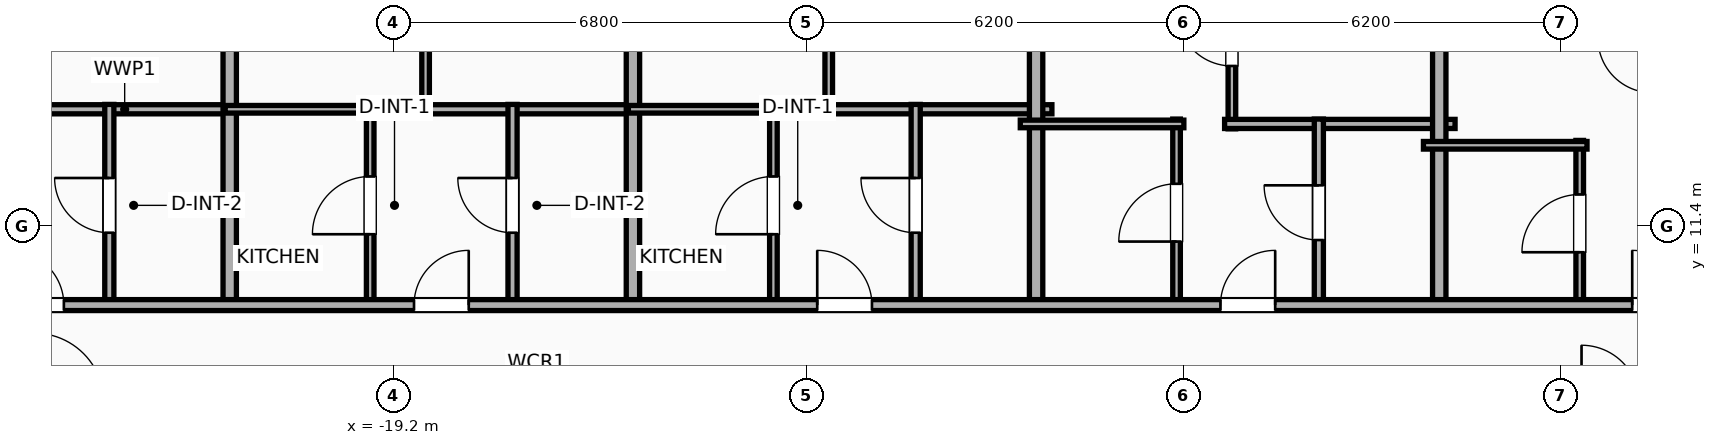
"""IFC4 building model, lengths in metres.
Left out: names, types, materials, properties, quantities, classifications, styles, units other than length and angle.
Written with IfcOpenShell. Run it as: python <this file> out.ifc"""

import sys

from ifc_helpers import new_model, si_unit, direction, frame, frame_2d, origin, place, context, subcontext, project, spatial, rectangle, extrude, element, fill, save


model = new_model("IFC4")
c1 = context("Model", 3, precision=1e-05, world=origin(), true_north=direction((0.0, 1.0)))
c2 = subcontext(c1, "Body", "Model", "MODEL_VIEW")
j1 = project(units=[si_unit("LENGTHUNIT", "METRE"), si_unit("PLANEANGLEUNIT", "RADIAN")], contexts=[c1])
p1 = place(None, origin())
s1 = spatial("IfcSite", under=j1, at=p1, CompositionType="ELEMENT")
p2 = place(p1, origin())
s2 = spatial("IfcBuilding", under=s1, at=p2, CompositionType="ELEMENT")
p3 = place(p2, frame((0.0, 0.0, 271.7)))
s3 = spatial("IfcBuildingStorey", under=s2, at=p3, CompositionType="ELEMENT", Elevation=271.7)
p4 = place(p3, frame((-25.421, 13.32, 0.0), z_axis=(0.0, 0.0, 1.0), x_axis=(1.0, 0.0, 0.0)))
e1 = element("IfcWall", 1, at=p4, inside=s3, PredefinedType="PLUMBINGWALL", context=c2, shape_type="SweptSolid", body=[
    extrude(rectangle(XDim=3.605, YDim=0.15, at=frame_2d((1.802, 0.0))), origin(), (0.0, 0.0, 1.0), 3.65),
])
p5 = place(p3, frame((-23.871, 10.08, 0.0), z_axis=(0.0, 0.0, 1.0), x_axis=(0.0, 1.0, 0.0)))
e2 = element("IfcWall", 2, at=p5, inside=s3, PredefinedType="PLUMBINGWALL", context=c2, shape_type="SweptSolid", body=[
    extrude(rectangle(XDim=3.32, YDim=0.15, at=frame_2d((1.66, 0.0))), origin(), (0.0, 0.0, 1.0), 3.65),
])
p6 = place(p5, frame((1.21, 0.0, 0.0)))
e3 = element("IfcOpeningElement", 3, at=p6, cuts=e2, PredefinedType="OPENING", context=c2, shape_type="SweptSolid", body=[
    extrude(rectangle(XDim=0.9, YDim=2.05, at=frame_2d((0.45, 1.025))), frame((0.0, 0.085, 0.0), z_axis=(0.0, -1.0, 0.0), x_axis=(1.0, 0.0, 0.0)), (0.0, 0.0, 1.0), 0.17),
])
p7 = place(p3, frame((-21.891, 10.02, 0.0), z_axis=(0.0, 0.0, 1.0), x_axis=(0.0, 1.0, 0.0)))
e4 = element("IfcWall", 4, at=p7, inside=s3, PredefinedType="PARTITIONING", context=c2, shape_type="SweptSolid", body=[
    extrude(rectangle(XDim=10.74, YDim=0.22, at=frame_2d((5.37, 0.0))), origin(), (0.0, 0.0, 1.0), 3.09),
])
p8 = place(p3, frame((-18.67, 13.24, 0.0), z_axis=(0.0, 0.0, 1.0), x_axis=(0.0, 1.0, 0.0)))
e5 = element("IfcWall", 5, at=p8, inside=s3, PredefinedType="PARTITIONING", context=c2, shape_type="SweptSolid", body=[
    extrude(rectangle(XDim=7.333, YDim=0.125, at=frame_2d((3.666, 0.0))), origin(), (0.0, 0.0, 1.0), 3.65),
])
p9 = place(p8, frame((1.31, 0.0, 0.0)))
e6 = element("IfcOpeningElement", 6, at=p9, cuts=e5, PredefinedType="OPENING", context=c2, shape_type="SweptSolid", body=[
    extrude(rectangle(XDim=0.9, YDim=2.05, at=frame_2d((0.45, 1.025))), frame((0.0, 0.073, 0.0), z_axis=(0.0, -1.0, 0.0), x_axis=(1.0, 0.0, 0.0)), (0.0, 0.0, 1.0), 0.145),
])
p10 = place(p3, frame((-18.79, 13.32, 0.0), z_axis=(0.0, 0.0, 1.0), x_axis=(1.0, 0.0, 0.0)))
e7 = element("IfcWall", 7, at=p10, inside=s3, PredefinedType="PLUMBINGWALL", context=c2, shape_type="SweptSolid", body=[
    extrude(rectangle(XDim=3.605, YDim=0.15, at=frame_2d((1.802, 0.0))), origin(), (0.0, 0.0, 1.0), 3.65),
])
p11 = place(p3, frame((-19.581, 10.08, 0.0), z_axis=(0.0, 0.0, 1.0), x_axis=(0.0, 1.0, 0.0)))
e8 = element("IfcWall", 8, at=p11, inside=s3, PredefinedType="PARTITIONING", context=c2, shape_type="SweptSolid", body=[
    extrude(rectangle(XDim=3.32, YDim=0.125, at=frame_2d((1.66, 0.0))), origin(), (0.0, 0.0, 1.0), 3.65),
])
p12 = place(p11, frame((1.185, 0.0, 0.0)))
e9 = element("IfcOpeningElement", 9, at=p12, cuts=e8, PredefinedType="OPENING", context=c2, shape_type="SweptSolid", body=[
    extrude(rectangle(XDim=0.95, YDim=2.05, at=frame_2d((0.475, 1.025))), frame((0.0, 0.073, 0.0), z_axis=(0.0, -1.0, 0.0), x_axis=(1.0, 0.0, 0.0)), (0.0, 0.0, 1.0), 0.145),
])
p13 = place(p3, frame((-21.966, 13.32, 0.0), z_axis=(0.0, 0.0, 1.0), x_axis=(1.0, 0.0, 0.0)))
e10 = element("IfcWall", 10, at=p13, inside=s3, PredefinedType="PARTITIONING", context=c2, shape_type="SweptSolid", body=[
    extrude(rectangle(XDim=2.505, YDim=0.125, at=frame_2d((1.252, 0.0))), origin(), (0.0, 0.0, 1.0), 3.65),
])
p14 = place(p3, frame((-17.24, 10.08, 0.0), z_axis=(0.0, 0.0, 1.0), x_axis=(0.0, 1.0, 0.0)))
e11 = element("IfcWall", 11, at=p14, inside=s3, PredefinedType="PLUMBINGWALL", context=c2, shape_type="SweptSolid", body=[
    extrude(rectangle(XDim=3.32, YDim=0.15, at=frame_2d((1.66, 0.0))), origin(), (0.0, 0.0, 1.0), 3.65),
])
p15 = place(p14, frame((1.21, 0.0, 0.0)))
e12 = element("IfcOpeningElement", 12, at=p15, cuts=e11, PredefinedType="OPENING", context=c2, shape_type="SweptSolid", body=[
    extrude(rectangle(XDim=0.9, YDim=2.05, at=frame_2d((0.45, 1.025))), frame((0.0, 0.085, 0.0), z_axis=(0.0, -1.0, 0.0), x_axis=(1.0, 0.0, 0.0)), (0.0, 0.0, 1.0), 0.17),
])
p16 = place(p3, frame((-15.26, 10.02, 0.0), z_axis=(0.0, 0.0, 1.0), x_axis=(0.0, 1.0, 0.0)))
e13 = element("IfcWall", 13, at=p16, inside=s3, PredefinedType="PARTITIONING", context=c2, shape_type="SweptSolid", body=[
    extrude(rectangle(XDim=10.043, YDim=0.22, at=frame_2d((5.021, 0.0))), origin(), (0.0, 0.0, 1.0), 3.09),
])
p17 = place(p3, frame((-12.04, 13.24, 0.0), z_axis=(0.0, 0.0, 1.0), x_axis=(0.0, 1.0, 0.0)))
e14 = element("IfcWall", 14, at=p17, inside=s3, PredefinedType="PARTITIONING", context=c2, shape_type="SweptSolid", body=[
    extrude(rectangle(XDim=6.635, YDim=0.125, at=frame_2d((3.318, 0.0))), origin(), (0.0, 0.0, 1.0), 3.65),
])
p18 = place(p17, frame((1.143, 0.0, 0.0)))
e15 = element("IfcOpeningElement", 15, at=p18, cuts=e14, PredefinedType="OPENING", context=c2, shape_type="SweptSolid", body=[
    extrude(rectangle(XDim=0.9, YDim=2.05, at=frame_2d((0.45, 1.025))), frame((0.0, 0.073, 0.0), z_axis=(0.0, -1.0, 0.0), x_axis=(1.0, 0.0, 0.0)), (0.0, 0.0, 1.0), 0.145),
])
p19 = place(p3, frame((-12.16, 13.32, 0.0), z_axis=(0.0, 0.0, 1.0), x_axis=(1.0, 0.0, 0.0)))
e16 = element("IfcWall", 16, at=p19, inside=s3, PredefinedType="PLUMBINGWALL", context=c2, shape_type="SweptSolid", body=[
    extrude(rectangle(XDim=3.79, YDim=0.15, at=frame_2d((1.895, 0.0))), origin(), (0.0, 0.0, 1.0), 3.65),
])
p20 = place(p3, frame((-12.95, 10.08, 0.0), z_axis=(0.0, 0.0, 1.0), x_axis=(0.0, 1.0, 0.0)))
e17 = element("IfcWall", 17, at=p20, inside=s3, PredefinedType="PARTITIONING", context=c2, shape_type="SweptSolid", body=[
    extrude(rectangle(XDim=3.32, YDim=0.125, at=frame_2d((1.66, 0.0))), origin(), (0.0, 0.0, 1.0), 3.65),
])
p21 = place(p20, frame((1.185, 0.0, 0.0)))
e18 = element("IfcOpeningElement", 18, at=p21, cuts=e17, PredefinedType="OPENING", context=c2, shape_type="SweptSolid", body=[
    extrude(rectangle(XDim=0.95, YDim=2.05, at=frame_2d((0.475, 1.025))), frame((0.0, 0.073, 0.0), z_axis=(0.0, -1.0, 0.0), x_axis=(1.0, 0.0, 0.0)), (0.0, 0.0, 1.0), 0.145),
])
p22 = place(p3, frame((-15.335, 13.32, 0.0), z_axis=(0.0, 0.0, 1.0), x_axis=(1.0, 0.0, 0.0)))
e19 = element("IfcWall", 19, at=p22, inside=s3, PredefinedType="PARTITIONING", context=c2, shape_type="SweptSolid", body=[
    extrude(rectangle(XDim=2.505, YDim=0.125, at=frame_2d((1.252, 0.0))), origin(), (0.0, 0.0, 1.0), 3.65),
])
p23 = place(p3, frame((-10.61, 10.08, 0.0), z_axis=(0.0, 0.0, 1.0), x_axis=(0.0, 1.0, 0.0)))
e20 = element("IfcWall", 20, at=p23, inside=s3, PredefinedType="PLUMBINGWALL", context=c2, shape_type="SweptSolid", body=[
    extrude(rectangle(XDim=3.32, YDim=0.15, at=frame_2d((1.66, 0.0))), origin(), (0.0, 0.0, 1.0), 3.65),
])
p24 = place(p23, frame((1.21, 0.0, 0.0)))
e21 = element("IfcOpeningElement", 21, at=p24, cuts=e20, PredefinedType="OPENING", context=c2, shape_type="SweptSolid", body=[
    extrude(rectangle(XDim=0.9, YDim=2.05, at=frame_2d((0.45, 1.025))), frame((0.0, 0.085, 0.0), z_axis=(0.0, -1.0, 0.0), x_axis=(1.0, 0.0, 0.0)), (0.0, 0.0, 1.0), 0.17),
])
p25 = place(p3, frame((-8.63, 10.02, 0.0), z_axis=(0.0, 0.0, 1.0), x_axis=(0.0, 1.0, 0.0)))
e22 = element("IfcWall", 22, at=p25, inside=s3, PredefinedType="PARTITIONING", context=c2, shape_type="SweptSolid", body=[
    extrude(rectangle(XDim=9.346, YDim=0.22, at=frame_2d((4.673, 0.0))), origin(), (0.0, 0.0, 1.0), 3.65),
])
p26 = place(p3, frame((-5.41, 12.999, 0.0), z_axis=(0.0, 0.0, 1.0), x_axis=(0.0, 1.0, 0.0)))
e23 = element("IfcWall", 23, at=p26, inside=s3, PredefinedType="PARTITIONING", context=c2, shape_type="SweptSolid", body=[
    extrude(rectangle(XDim=6.18, YDim=0.125, at=frame_2d((3.09, 0.0))), origin(), (0.0, 0.0, 1.0), 3.09),
])
p27 = place(p26, frame((1.033, 0.0, 0.0)))
e24 = element("IfcOpeningElement", 24, at=p27, cuts=e23, PredefinedType="OPENING", context=c2, shape_type="SweptSolid", body=[
    extrude(rectangle(XDim=0.9, YDim=2.05, at=frame_2d((0.45, 1.025))), frame((0.0, 0.073, 0.0), z_axis=(0.0, -1.0, 0.0), x_axis=(1.0, 0.0, 0.0)), (0.0, 0.0, 1.0), 0.145),
])
p28 = place(p3, frame((-5.53, 13.079, 0.0), z_axis=(0.0, 0.0, 1.0), x_axis=(1.0, 0.0, 0.0)))
e25 = element("IfcWall", 25, at=p28, inside=s3, PredefinedType="PLUMBINGWALL", context=c2, shape_type="SweptSolid", body=[
    extrude(rectangle(XDim=3.79, YDim=0.15, at=frame_2d((1.895, 0.0))), origin(), (0.0, 0.0, 1.0), 3.65),
])
p29 = place(p3, frame((-6.32, 10.08, 0.0), z_axis=(0.0, 0.0, 1.0), x_axis=(0.0, 1.0, 0.0)))
e26 = element("IfcWall", 26, at=p29, inside=s3, PredefinedType="PARTITIONING", context=c2, shape_type="SweptSolid", body=[
    extrude(rectangle(XDim=3.079, YDim=0.125, at=frame_2d((1.54, 0.0))), origin(), (0.0, 0.0, 1.0), 3.65),
])
p30 = place(p29, frame((1.064, 0.0, 0.0)))
e27 = element("IfcOpeningElement", 27, at=p30, cuts=e26, PredefinedType="OPENING", context=c2, shape_type="SweptSolid", body=[
    extrude(rectangle(XDim=0.95, YDim=2.05, at=frame_2d((0.475, 1.025))), frame((0.0, 0.073, 0.0), z_axis=(0.0, -1.0, 0.0), x_axis=(1.0, 0.0, 0.0)), (0.0, 0.0, 1.0), 0.145),
])
p31 = place(p3, frame((-8.89, 13.079, 0.0), z_axis=(0.0, 0.0, 1.0), x_axis=(1.0, 0.0, 0.0)))
e28 = element("IfcWall", 28, at=p31, inside=s3, PredefinedType="PARTITIONING", context=c2, shape_type="SweptSolid", body=[
    extrude(rectangle(XDim=2.69, YDim=0.125, at=frame_2d((1.345, 0.0))), origin(), (0.0, 0.0, 1.0), 3.65),
])
p32 = place(p3, frame((-3.98, 10.08, 0.0), z_axis=(0.0, 0.0, 1.0), x_axis=(0.0, 1.0, 0.0)))
e29 = element("IfcWall", 29, at=p32, inside=s3, PredefinedType="PLUMBINGWALL", context=c2, shape_type="SweptSolid", body=[
    extrude(rectangle(XDim=3.079, YDim=0.15, at=frame_2d((1.54, 0.0))), origin(), (0.0, 0.0, 1.0), 3.65),
])
p33 = place(p32, frame((1.09, 0.0, 0.0)))
e30 = element("IfcOpeningElement", 30, at=p33, cuts=e29, PredefinedType="OPENING", context=c2, shape_type="SweptSolid", body=[
    extrude(rectangle(XDim=0.9, YDim=2.05, at=frame_2d((0.45, 1.025))), frame((0.0, 0.085, 0.0), z_axis=(0.0, -1.0, 0.0), x_axis=(1.0, 0.0, 0.0)), (0.0, 0.0, 1.0), 0.17),
])
p34 = place(p3, frame((-2.0, 10.02, 0.0), z_axis=(0.0, 0.0, 1.0), x_axis=(0.0, 1.0, 0.0)))
e31 = element("IfcWall", 31, at=p34, inside=s3, PredefinedType="PARTITIONING", context=c2, shape_type="SweptSolid", body=[
    extrude(rectangle(XDim=8.65, YDim=0.22, at=frame_2d((4.325, 0.0))), origin(), (0.0, 0.0, 1.0), 3.65),
])
p35 = place(p3, frame((0.31, 10.08, 0.0), z_axis=(0.0, 0.0, 1.0), x_axis=(0.0, 1.0, 0.0)))
e32 = element("IfcWall", 32, at=p35, inside=s3, PredefinedType="PARTITIONING", context=c2, shape_type="SweptSolid", body=[
    extrude(rectangle(XDim=2.728, YDim=0.125, at=frame_2d((1.364, 0.0))), origin(), (0.0, 0.0, 1.0), 3.65),
])
p36 = place(p35, frame((0.889, 0.0, 0.0)))
e33 = element("IfcOpeningElement", 33, at=p36, cuts=e32, PredefinedType="OPENING", context=c2, shape_type="SweptSolid", body=[
    extrude(rectangle(XDim=0.95, YDim=2.05, at=frame_2d((0.475, 1.025))), frame((0.0, 0.073, 0.0), z_axis=(0.0, -1.0, 0.0), x_axis=(1.0, 0.0, 0.0)), (0.0, 0.0, 1.0), 0.145),
])
p37 = place(p3, frame((-2.26, 12.728, 0.0), z_axis=(0.0, 0.0, 1.0), x_axis=(1.0, 0.0, 0.0)))
e34 = element("IfcWall", 34, at=p37, inside=s3, PredefinedType="PARTITIONING", context=c2, shape_type="SweptSolid", body=[
    extrude(rectangle(XDim=2.69, YDim=0.125, at=frame_2d((1.345, 0.0))), origin(), (0.0, 0.0, 1.0), 3.65),
])
p38 = place(p3, frame((-28.516, 10.1, 0.0), z_axis=(0.0, 0.0, 1.0), x_axis=(1.0, 0.0, 0.0)))
e35 = element("IfcWall", 35, at=p38, inside=s3, PredefinedType="PARTITIONING", context=c2, shape_type="SweptSolid", body=[
    extrude(rectangle(XDim=53.955, YDim=0.18, at=frame_2d((26.978, 0.0))), origin(), (0.0, 0.0, 1.0), 3.65),
])
p39 = place(p38, frame((2.998, 0.0, 0.0)))
e36 = element("IfcOpeningElement", 36, at=p39, cuts=e35, PredefinedType="OPENING", context=c2, shape_type="SweptSolid", body=[
    extrude(rectangle(XDim=0.9, YDim=2.05, at=frame_2d((0.45, 1.025))), frame((0.0, 0.1, 0.0), z_axis=(0.0, -1.0, 0.0), x_axis=(1.0, 0.0, 0.0)), (0.0, 0.0, 1.0), 0.2),
])
p40 = place(p38, frame((9.656, 0.0, 0.0)))
e37 = element("IfcOpeningElement", 37, at=p40, cuts=e35, PredefinedType="OPENING", context=c2, shape_type="SweptSolid", body=[
    extrude(rectangle(XDim=0.9, YDim=2.05, at=frame_2d((0.45, 1.025))), frame((0.0, 0.1, 0.0), z_axis=(0.0, -1.0, 0.0), x_axis=(1.0, 0.0, 0.0)), (0.0, 0.0, 1.0), 0.2),
])
p41 = place(p38, frame((16.287, 0.0, 0.0)))
e38 = element("IfcOpeningElement", 38, at=p41, cuts=e35, PredefinedType="OPENING", context=c2, shape_type="SweptSolid", body=[
    extrude(rectangle(XDim=0.9, YDim=2.05, at=frame_2d((0.45, 1.025))), frame((0.0, 0.1, 0.0), z_axis=(0.0, -1.0, 0.0), x_axis=(1.0, 0.0, 0.0)), (0.0, 0.0, 1.0), 0.2),
])
p42 = place(p38, frame((22.918, 0.0, 0.0)))
e39 = element("IfcOpeningElement", 39, at=p42, cuts=e35, PredefinedType="OPENING", context=c2, shape_type="SweptSolid", body=[
    extrude(rectangle(XDim=0.9, YDim=2.05, at=frame_2d((0.45, 1.025))), frame((0.0, 0.1, 0.0), z_axis=(0.0, -1.0, 0.0), x_axis=(1.0, 0.0, 0.0)), (0.0, 0.0, 1.0), 0.2),
])
p43 = place(p38, frame((29.689, 0.0, 0.0)))
e40 = element("IfcOpeningElement", 40, at=p43, cuts=e35, PredefinedType="OPENING", context=c2, shape_type="SweptSolid", body=[
    extrude(rectangle(XDim=0.9, YDim=2.05, at=frame_2d((0.45, 1.025))), frame((0.0, 0.1, 0.0), z_axis=(0.0, -1.0, 0.0), x_axis=(1.0, 0.0, 0.0)), (0.0, 0.0, 1.0), 0.2),
])
p44 = place(p38, frame((36.612, 0.0, 0.0)))
e41 = element("IfcOpeningElement", 41, at=p44, cuts=e35, PredefinedType="OPENING", context=c2, shape_type="SweptSolid", body=[
    extrude(rectangle(XDim=0.9, YDim=2.05, at=frame_2d((0.45, 1.025))), frame((0.0, 0.1, 0.0), z_axis=(0.0, -1.0, 0.0), x_axis=(1.0, 0.0, 0.0)), (0.0, 0.0, 1.0), 0.2),
])
p45 = place(p38, frame((43.529, 0.0, 0.0)))
e42 = element("IfcOpeningElement", 42, at=p45, cuts=e35, PredefinedType="OPENING", context=c2, shape_type="SweptSolid", body=[
    extrude(rectangle(XDim=0.9, YDim=2.05, at=frame_2d((0.45, 1.025))), frame((0.0, 0.1, 0.0), z_axis=(0.0, -1.0, 0.0), x_axis=(1.0, 0.0, 0.0)), (0.0, 0.0, 1.0), 0.2),
])
p46 = place(p38, frame((50.452, 0.0, 0.0)))
e43 = element("IfcOpeningElement", 43, at=p46, cuts=e35, PredefinedType="OPENING", context=c2, shape_type="SweptSolid", body=[
    extrude(rectangle(XDim=0.9, YDim=2.05, at=frame_2d((0.45, 1.025))), frame((0.0, 0.1, 0.0), z_axis=(0.0, -1.0, 0.0), x_axis=(1.0, 0.0, 0.0)), (0.0, 0.0, 1.0), 0.2),
])
p47 = place(p6, origin())
e44 = element("IfcDoor", 44, at=p47, inside=s3, OperationType="SINGLE_SWING_RIGHT", PredefinedType="DOOR", context=c2, shape_type="SweptSolid", body=[
    extrude(rectangle(XDim=0.9, YDim=2.05, at=frame_2d((0.45, 1.025))), frame((0.0, 0.025, 0.0), z_axis=(0.0, -1.0, 0.0), x_axis=(1.0, 0.0, 0.0)), (0.0, 0.0, 1.0), 0.05),
])
fill(e3, e44)
p48 = place(p12, origin())
e45 = element("IfcDoor", 45, at=p48, inside=s3, OperationType="SINGLE_SWING_LEFT", PredefinedType="DOOR", context=c2, shape_type="SweptSolid", body=[
    extrude(rectangle(XDim=0.95, YDim=2.05, at=frame_2d((0.475, 1.025))), frame((0.0, 0.025, 0.0), z_axis=(0.0, -1.0, 0.0), x_axis=(1.0, 0.0, 0.0)), (0.0, 0.0, 1.0), 0.05),
])
fill(e9, e45)
p49 = place(p15, origin())
e46 = element("IfcDoor", 46, at=p49, inside=s3, OperationType="SINGLE_SWING_RIGHT", PredefinedType="DOOR", context=c2, shape_type="SweptSolid", body=[
    extrude(rectangle(XDim=0.9, YDim=2.05, at=frame_2d((0.45, 1.025))), frame((0.0, 0.025, 0.0), z_axis=(0.0, -1.0, 0.0), x_axis=(1.0, 0.0, 0.0)), (0.0, 0.0, 1.0), 0.05),
])
fill(e12, e46)
p50 = place(p21, origin())
e47 = element("IfcDoor", 47, at=p50, inside=s3, OperationType="SINGLE_SWING_LEFT", PredefinedType="DOOR", context=c2, shape_type="SweptSolid", body=[
    extrude(rectangle(XDim=0.95, YDim=2.05, at=frame_2d((0.475, 1.025))), frame((0.0, 0.025, 0.0), z_axis=(0.0, -1.0, 0.0), x_axis=(1.0, 0.0, 0.0)), (0.0, 0.0, 1.0), 0.05),
])
fill(e18, e47)
p51 = place(p24, origin())
e48 = element("IfcDoor", 48, at=p51, inside=s3, OperationType="SINGLE_SWING_RIGHT", PredefinedType="DOOR", context=c2, shape_type="SweptSolid", body=[
    extrude(rectangle(XDim=0.9, YDim=2.05, at=frame_2d((0.45, 1.025))), frame((0.0, 0.025, 0.0), z_axis=(0.0, -1.0, 0.0), x_axis=(1.0, 0.0, 0.0)), (0.0, 0.0, 1.0), 0.05),
])
fill(e21, e48)
p52 = place(p27, origin())
e49 = element("IfcDoor", 49, at=p52, inside=s3, OperationType="SINGLE_SWING_RIGHT", PredefinedType="DOOR", context=c2, shape_type="SweptSolid", body=[
    extrude(rectangle(XDim=0.9, YDim=2.05, at=frame_2d((0.45, 1.025))), frame((0.0, 0.025, 0.0), z_axis=(0.0, -1.0, 0.0), x_axis=(1.0, 0.0, 0.0)), (0.0, 0.0, 1.0), 0.05),
])
fill(e24, e49)
p53 = place(p30, origin())
e50 = element("IfcDoor", 50, at=p53, inside=s3, OperationType="SINGLE_SWING_LEFT", PredefinedType="DOOR", context=c2, shape_type="SweptSolid", body=[
    extrude(rectangle(XDim=0.95, YDim=2.05, at=frame_2d((0.475, 1.025))), frame((0.0, 0.025, 0.0), z_axis=(0.0, -1.0, 0.0), x_axis=(1.0, 0.0, 0.0)), (0.0, 0.0, 1.0), 0.05),
])
fill(e27, e50)
p54 = place(p33, origin())
e51 = element("IfcDoor", 51, at=p54, inside=s3, OperationType="SINGLE_SWING_RIGHT", PredefinedType="DOOR", context=c2, shape_type="SweptSolid", body=[
    extrude(rectangle(XDim=0.9, YDim=2.05, at=frame_2d((0.45, 1.025))), frame((0.0, 0.025, 0.0), z_axis=(0.0, -1.0, 0.0), x_axis=(1.0, 0.0, 0.0)), (0.0, 0.0, 1.0), 0.05),
])
fill(e30, e51)
p55 = place(p36, origin())
e52 = element("IfcDoor", 52, at=p55, inside=s3, OperationType="SINGLE_SWING_LEFT", PredefinedType="DOOR", context=c2, shape_type="SweptSolid", body=[
    extrude(rectangle(XDim=0.95, YDim=2.05, at=frame_2d((0.475, 1.025))), frame((0.0, 0.025, 0.0), z_axis=(0.0, -1.0, 0.0), x_axis=(1.0, 0.0, 0.0)), (0.0, 0.0, 1.0), 0.05),
])
fill(e33, e52)
p56 = place(p39, origin())
e53 = element("IfcDoor", 53, at=p56, inside=s3, OperationType="SINGLE_SWING_LEFT", PredefinedType="DOOR", context=c2, shape_type="SweptSolid", body=[
    extrude(rectangle(XDim=0.9, YDim=2.05, at=frame_2d((0.45, 1.025))), frame((0.0, 0.025, 0.0), z_axis=(0.0, -1.0, 0.0), x_axis=(1.0, 0.0, 0.0)), (0.0, 0.0, 1.0), 0.05),
])
fill(e36, e53)
p57 = place(p40, origin())
e54 = element("IfcDoor", 54, at=p57, inside=s3, OperationType="SINGLE_SWING_RIGHT", PredefinedType="DOOR", context=c2, shape_type="SweptSolid", body=[
    extrude(rectangle(XDim=0.9, YDim=2.05, at=frame_2d((0.45, 1.025))), frame((0.0, 0.025, 0.0), z_axis=(0.0, -1.0, 0.0), x_axis=(1.0, 0.0, 0.0)), (0.0, 0.0, 1.0), 0.05),
])
fill(e37, e54)
p58 = place(p41, origin())
e55 = element("IfcDoor", 55, at=p58, inside=s3, OperationType="SINGLE_SWING_LEFT", PredefinedType="DOOR", context=c2, shape_type="SweptSolid", body=[
    extrude(rectangle(XDim=0.9, YDim=2.05, at=frame_2d((0.45, 1.025))), frame((0.0, 0.025, 0.0), z_axis=(0.0, -1.0, 0.0), x_axis=(1.0, 0.0, 0.0)), (0.0, 0.0, 1.0), 0.05),
])
fill(e38, e55)
p59 = place(p42, origin())
e56 = element("IfcDoor", 56, at=p59, inside=s3, OperationType="SINGLE_SWING_RIGHT", PredefinedType="DOOR", context=c2, shape_type="SweptSolid", body=[
    extrude(rectangle(XDim=0.9, YDim=2.05, at=frame_2d((0.45, 1.025))), frame((0.0, 0.025, 0.0), z_axis=(0.0, -1.0, 0.0), x_axis=(1.0, 0.0, 0.0)), (0.0, 0.0, 1.0), 0.05),
])
fill(e39, e56)
p60 = place(p43, origin())
e57 = element("IfcDoor", 57, at=p60, inside=s3, OperationType="SINGLE_SWING_LEFT", PredefinedType="DOOR", context=c2, shape_type="SweptSolid", body=[
    extrude(rectangle(XDim=0.9, YDim=2.05, at=frame_2d((0.45, 1.025))), frame((0.0, 0.025, 0.0), z_axis=(0.0, -1.0, 0.0), x_axis=(1.0, 0.0, 0.0)), (0.0, 0.0, 1.0), 0.05),
])
fill(e40, e57)
save(model, sys.argv[1])
